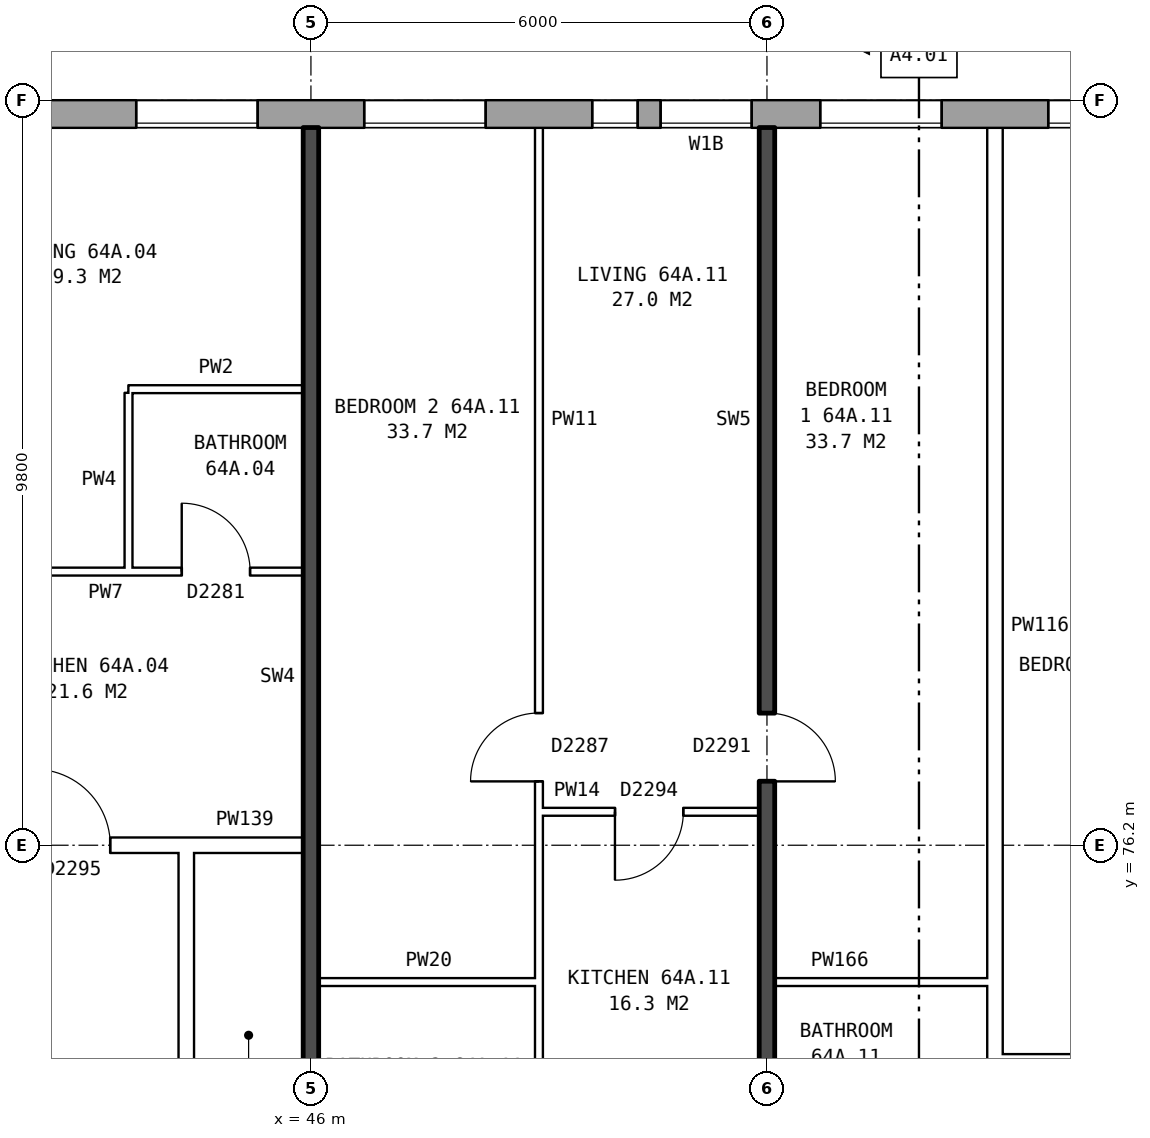
"""IFC4 building model, lengths in metres.
Left out: names, types, materials, properties, quantities, classifications, styles, units other than length and angle.
Written with IfcOpenShell. Run it as: python <this file> out.ifc"""

import sys

from ifc_helpers import new_model, si_unit, direction, frame, frame_2d, origin, place, context, subcontext, project, spatial, rectangle, extrude, element, fill, save


model = new_model("IFC4")
c1 = context("Model", 3, precision=1e-05, world=origin(), true_north=direction((0.0, 1.0)))
c2 = subcontext(c1, "Body", "Model", "MODEL_VIEW")
j1 = project(units=[si_unit("LENGTHUNIT", "METRE"), si_unit("PLANEANGLEUNIT", "RADIAN")], contexts=[c1])
p1 = place(None, origin())
s1 = spatial("IfcSite", under=j1, at=p1, CompositionType="ELEMENT")
p2 = place(p1, origin())
s2 = spatial("IfcBuilding", under=s1, at=p2, CompositionType="ELEMENT")
p3 = place(p2, frame((0.0, 0.0, 227.6)))
s3 = spatial("IfcBuildingStorey", under=s2, at=p3, CompositionType="ELEMENT", Elevation=227.6)
p4 = place(p3, frame((74.95, 85.82, 0.0), z_axis=(0.0, 0.0, 1.0), x_axis=(-1.0, 0.0, 0.0)))
e1 = element("IfcWall", 1, at=p4, inside=s3, PredefinedType="STANDARD", context=c2, shape_type="SweptSolid", body=[
    extrude(rectangle(XDim=39.875, YDim=0.36, at=frame_2d((19.938, 0.0))), origin(), (0.0, 0.0, 1.0), 2.85),
])
p5 = place(p4, frame((2.65, 0.0, 0.8)))
e2 = element("IfcOpeningElement", 2, at=p5, cuts=e1, PredefinedType="OPENING", context=c2, shape_type="SweptSolid", body=[
    extrude(rectangle(XDim=1.6, YDim=1.8, at=frame_2d((0.8, 0.9))), frame((0.0, 0.19, 0.0), z_axis=(0.0, -1.0, 0.0), x_axis=(1.0, 0.0, 0.0)), (0.0, 0.0, 1.0), 0.38),
])
p6 = place(p4, frame((5.65, 0.0, 0.8)))
e3 = element("IfcOpeningElement", 3, at=p6, cuts=e1, PredefinedType="OPENING", context=c2, shape_type="SweptSolid", body=[
    extrude(rectangle(XDim=1.6, YDim=1.8, at=frame_2d((0.8, 0.9))), frame((0.0, 0.19, 0.0), z_axis=(0.0, -1.0, 0.0), x_axis=(1.0, 0.0, 0.0)), (0.0, 0.0, 1.0), 0.38),
])
p7 = place(p4, frame((8.65, 0.0, 0.8)))
e4 = element("IfcOpeningElement", 4, at=p7, cuts=e1, PredefinedType="OPENING", context=c2, shape_type="SweptSolid", body=[
    extrude(rectangle(XDim=1.6, YDim=1.8, at=frame_2d((0.8, 0.9))), frame((0.0, 0.19, 0.0), z_axis=(0.0, -1.0, 0.0), x_axis=(1.0, 0.0, 0.0)), (0.0, 0.0, 1.0), 0.38),
])
p8 = place(p4, frame((11.65, 0.0, 0.8)))
e5 = element("IfcOpeningElement", 5, at=p8, cuts=e1, PredefinedType="OPENING", context=c2, shape_type="SweptSolid", body=[
    extrude(rectangle(XDim=1.6, YDim=1.8, at=frame_2d((0.8, 0.9))), frame((0.0, 0.19, 0.0), z_axis=(0.0, -1.0, 0.0), x_axis=(1.0, 0.0, 0.0)), (0.0, 0.0, 1.0), 0.38),
])
p9 = place(p4, frame((14.1, 0.0, 0.8)))
e6 = element("IfcOpeningElement", 6, at=p9, cuts=e1, PredefinedType="OPENING", context=c2, shape_type="SweptSolid", body=[
    extrude(rectangle(XDim=0.8, YDim=1.8, at=frame_2d((0.4, 0.9))), frame((0.0, 0.19, 0.0), z_axis=(0.0, -1.0, 0.0), x_axis=(1.0, 0.0, 0.0)), (0.0, 0.0, 1.0), 0.38),
])
p10 = place(p4, frame((17.65, 0.0, 0.8)))
e7 = element("IfcOpeningElement", 7, at=p10, cuts=e1, PredefinedType="OPENING", context=c2, shape_type="SweptSolid", body=[
    extrude(rectangle(XDim=1.6, YDim=1.8, at=frame_2d((0.8, 0.9))), frame((0.0, 0.19, 0.0), z_axis=(0.0, -1.0, 0.0), x_axis=(1.0, 0.0, 0.0)), (0.0, 0.0, 1.0), 0.38),
])
p11 = place(p4, frame((20.65, 0.0, 0.8)))
e8 = element("IfcOpeningElement", 8, at=p11, cuts=e1, PredefinedType="OPENING", context=c2, shape_type="SweptSolid", body=[
    extrude(rectangle(XDim=1.6, YDim=1.8, at=frame_2d((0.8, 0.9))), frame((0.0, 0.19, 0.0), z_axis=(0.0, -1.0, 0.0), x_axis=(1.0, 0.0, 0.0)), (0.0, 0.0, 1.0), 0.38),
])
p12 = place(p4, frame((23.15, 0.0, 0.75)))
e9 = element("IfcOpeningElement", 9, at=p12, cuts=e1, PredefinedType="OPENING", context=c2, shape_type="SweptSolid", body=[
    extrude(rectangle(XDim=1.2, YDim=1.8, at=frame_2d((0.6, 0.9))), frame((0.0, 0.19, 0.0), z_axis=(0.0, -1.0, 0.0), x_axis=(1.0, 0.0, 0.0)), (0.0, 0.0, 1.0), 0.38),
])
p13 = place(p4, frame((26.65, 0.0, 0.8)))
e10 = element("IfcOpeningElement", 10, at=p13, cuts=e1, PredefinedType="OPENING", context=c2, shape_type="SweptSolid", body=[
    extrude(rectangle(XDim=1.6, YDim=1.8, at=frame_2d((0.8, 0.9))), frame((0.0, 0.19, 0.0), z_axis=(0.0, -1.0, 0.0), x_axis=(1.0, 0.0, 0.0)), (0.0, 0.0, 1.0), 0.38),
])
p14 = place(p4, frame((29.65, 0.0, 0.8)))
e11 = element("IfcOpeningElement", 11, at=p14, cuts=e1, PredefinedType="OPENING", context=c2, shape_type="SweptSolid", body=[
    extrude(rectangle(XDim=1.6, YDim=1.8, at=frame_2d((0.8, 0.9))), frame((0.0, 0.19, 0.0), z_axis=(0.0, -1.0, 0.0), x_axis=(1.0, 0.0, 0.0)), (0.0, 0.0, 1.0), 0.38),
])
p15 = place(p4, frame((32.65, 0.0, 0.8)))
e12 = element("IfcOpeningElement", 12, at=p15, cuts=e1, PredefinedType="OPENING", context=c2, shape_type="SweptSolid", body=[
    extrude(rectangle(XDim=1.6, YDim=1.8, at=frame_2d((0.8, 0.9))), frame((0.0, 0.19, 0.0), z_axis=(0.0, -1.0, 0.0), x_axis=(1.0, 0.0, 0.0)), (0.0, 0.0, 1.0), 0.38),
])
p16 = place(p4, frame((35.65, 0.0, 0.8)))
e13 = element("IfcOpeningElement", 13, at=p16, cuts=e1, PredefinedType="OPENING", context=c2, shape_type="SweptSolid", body=[
    extrude(rectangle(XDim=1.6, YDim=1.8, at=frame_2d((0.8, 0.9))), frame((0.0, 0.19, 0.0), z_axis=(0.0, -1.0, 0.0), x_axis=(1.0, 0.0, 0.0)), (0.0, 0.0, 1.0), 0.38),
])
p17 = place(p4, frame((15.2, 0.0, 1.7)))
e14 = element("IfcOpeningElement", 14, at=p17, cuts=e1, PredefinedType="OPENING", context=c2, shape_type="SweptSolid", body=[
    extrude(rectangle(XDim=0.6, YDim=0.9, at=frame_2d((0.3, 0.45))), frame((0.0, 0.19, 0.0), z_axis=(0.0, -1.0, 0.0), x_axis=(1.0, 0.0, 0.0)), (0.0, 0.0, 1.0), 0.38),
])
p18 = place(p4, frame((24.65, 0.0, 0.35)))
e15 = element("IfcOpeningElement", 15, at=p18, cuts=e1, PredefinedType="OPENING", context=c2, shape_type="SweptSolid", body=[
    extrude(rectangle(XDim=0.6, YDim=0.9, at=frame_2d((0.3, 0.45))), frame((0.0, 0.19, 0.0), z_axis=(0.0, -1.0, 0.0), x_axis=(1.0, 0.0, 0.0)), (0.0, 0.0, 1.0), 0.38),
])
p19 = place(p3, frame((44.36, 63.9, 0.0), z_axis=(0.0, 0.0, 1.0), x_axis=(0.0, 1.0, 0.0)))
e16 = element("IfcWall", 16, at=p19, inside=s3, PredefinedType="PARTITIONING", context=c2, shape_type="SweptSolid", body=[
    extrude(rectangle(XDim=12.2, YDim=0.2, at=frame_2d((6.1, 0.0))), origin(), (0.0, 0.0, 1.0), 2.85),
])
p20 = place(p19, frame((5.1, 0.0, 0.0)))
e17 = element("IfcOpeningElement", 17, at=p20, cuts=e16, PredefinedType="OPENING", context=c2, shape_type="SweptSolid", body=[
    extrude(rectangle(XDim=2.0, YDim=2.1, at=frame_2d((1.0, 1.05))), frame((0.0, 0.11, 0.0), z_axis=(0.0, -1.0, 0.0), x_axis=(1.0, 0.0, 0.0)), (0.0, 0.0, 1.0), 0.22),
])
p21 = place(p3, frame((55.1, 73.4, 0.0), z_axis=(0.0, 0.0, 1.0), x_axis=(1.0, 0.0, 0.0)))
e18 = element("IfcWall", 18, at=p21, inside=s3, PredefinedType="PARTITIONING", context=c2, shape_type="SweptSolid", body=[
    extrude(rectangle(XDim=2.8, YDim=0.1, at=frame_2d((1.4, 0.0))), origin(), (0.0, 0.0, 1.0), 2.85),
])
p22 = place(p3, frame((46.1, 74.4, 0.0), z_axis=(0.0, 0.0, 1.0), x_axis=(1.0, 0.0, 0.0)))
e19 = element("IfcWall", 19, at=p22, inside=s3, PredefinedType="PARTITIONING", context=c2, shape_type="SweptSolid", body=[
    extrude(rectangle(XDim=2.9, YDim=0.1, at=frame_2d((1.45, 0.0))), origin(), (0.0, 0.0, 1.0), 2.85),
])
p23 = place(p3, frame((52.1, 74.4, 0.0), z_axis=(0.0, 0.0, 1.0), x_axis=(1.0, 0.0, 0.0)))
e20 = element("IfcWall", 20, at=p23, inside=s3, PredefinedType="PARTITIONING", context=c2, shape_type="SweptSolid", body=[
    extrude(rectangle(XDim=2.8, YDim=0.1, at=frame_2d((1.4, 0.0))), origin(), (0.0, 0.0, 1.0), 2.85),
])
p24 = place(p3, frame((41.36, 76.2, 0.0), z_axis=(0.0, 0.0, 1.0), x_axis=(1.0, 0.0, 0.0)))
e21 = element("IfcWall", 21, at=p24, inside=s3, PredefinedType="PARTITIONING", context=c2, shape_type="SweptSolid", body=[
    extrude(rectangle(XDim=3.0, YDim=0.2, at=frame_2d((1.5, 0.0))), origin(), (0.0, 0.0, 1.0), 2.85),
])
p25 = place(p24, frame((1.0, 0.0, 0.0)))
e22 = element("IfcOpeningElement", 22, at=p25, cuts=e21, PredefinedType="OPENING", context=c2, shape_type="SweptSolid", body=[
    extrude(rectangle(XDim=1.0, YDim=2.1, at=frame_2d((0.5, 1.05))), frame((0.0, 0.11, 0.0), z_axis=(0.0, -1.0, 0.0), x_axis=(1.0, 0.0, 0.0)), (0.0, 0.0, 1.0), 0.22),
])
p26 = place(p3, frame((44.36, 76.2, 0.0), z_axis=(0.0, 0.0, 1.0), x_axis=(1.0, 0.0, 0.0)))
e23 = element("IfcWall", 23, at=p26, inside=s3, PredefinedType="PARTITIONING", context=c2, shape_type="SweptSolid", body=[
    extrude(rectangle(XDim=1.54, YDim=0.2, at=frame_2d((0.77, 0.0))), origin(), (0.0, 0.0, 1.0), 2.85),
])
p27 = place(p3, frame((49.0, 76.64, 0.0), z_axis=(0.0, 0.0, 1.0), x_axis=(1.0, 0.0, 0.0)))
e24 = element("IfcWall", 24, at=p27, inside=s3, PredefinedType="PARTITIONING", context=c2, shape_type="SweptSolid", body=[
    extrude(rectangle(XDim=2.9, YDim=0.1, at=frame_2d((1.45, 0.0))), origin(), (0.0, 0.0, 1.0), 2.85),
])
p28 = place(p27, frame((1.0, 0.0, 0.0)))
e25 = element("IfcOpeningElement", 25, at=p28, cuts=e24, PredefinedType="OPENING", context=c2, shape_type="SweptSolid", body=[
    extrude(rectangle(XDim=0.9, YDim=2.1, at=frame_2d((0.45, 1.05))), frame((0.0, 0.06, 0.0), z_axis=(0.0, -1.0, 0.0), x_axis=(1.0, 0.0, 0.0)), (0.0, 0.0, 1.0), 0.12),
])
p29 = place(p3, frame((40.1, 79.8, 0.0), z_axis=(0.0, 0.0, 1.0), x_axis=(1.0, 0.0, 0.0)))
e26 = element("IfcWall", 26, at=p29, inside=s3, PredefinedType="PARTITIONING", context=c2, shape_type="SweptSolid", body=[
    extrude(rectangle(XDim=5.8, YDim=0.1, at=frame_2d((2.9, 0.0))), origin(), (0.0, 0.0, 1.0), 2.85),
])
p30 = place(p29, frame((1.3, 0.0, 0.0)))
e27 = element("IfcOpeningElement", 27, at=p30, cuts=e26, PredefinedType="OPENING", context=c2, shape_type="SweptSolid", body=[
    extrude(rectangle(XDim=0.9, YDim=2.1, at=frame_2d((0.45, 1.05))), frame((0.0, 0.06, 0.0), z_axis=(0.0, -1.0, 0.0), x_axis=(1.0, 0.0, 0.0)), (0.0, 0.0, 1.0), 0.12),
])
p31 = place(p29, frame((4.2, 0.0, 0.0)))
e28 = element("IfcOpeningElement", 28, at=p31, cuts=e26, PredefinedType="OPENING", context=c2, shape_type="SweptSolid", body=[
    extrude(rectangle(XDim=0.9, YDim=2.1, at=frame_2d((0.45, 1.05))), frame((0.0, 0.06, 0.0), z_axis=(0.0, -1.0, 0.0), x_axis=(1.0, 0.0, 0.0)), (0.0, 0.0, 1.0), 0.12),
])
for number, where, z_axis, x_axis in (
    (29, (43.6, 82.2, 0.0), (0.0, 0.0, 1.0), (1.0, 0.0, 0.0)),
    (30, (43.6, 79.85, 0.0), (0.0, 0.0, 1.0), (0.0, 1.0, 0.0)),
):
    element("IfcWall", number, at=place(p3, frame(where, z_axis=z_axis, x_axis=x_axis)), inside=s3, PredefinedType="PARTITIONING", context=c2, shape_type="SweptSolid", body=[
        extrude(rectangle(XDim=2.3, YDim=0.1, at=frame_2d((1.15, 0.0))), origin(), (0.0, 0.0, 1.0), 2.85),
    ])
p32 = place(p3, frame((46.0, 71.2, 0.0), z_axis=(0.0, 0.0, 1.0), x_axis=(0.0, 1.0, 0.0)))
e31 = element("IfcWall", 31, at=p32, inside=s3, PredefinedType="SOLIDWALL", context=c2, shape_type="SweptSolid", body=[
    extrude(rectangle(XDim=14.44, YDim=0.2, at=frame_2d((7.22, 0.0))), origin(), (0.0, 0.0, 1.0), 2.85),
])
p33 = place(p3, frame((49.0, 71.3, 0.0), z_axis=(0.0, 0.0, 1.0), x_axis=(0.0, 1.0, 0.0)))
e32 = element("IfcWall", 32, at=p33, inside=s3, PredefinedType="PARTITIONING", context=c2, shape_type="SweptSolid", body=[
    extrude(rectangle(XDim=14.34, YDim=0.1, at=frame_2d((7.17, 0.0))), origin(), (0.0, 0.0, 1.0), 2.85),
])
p34 = place(p33, frame((5.74, 0.0, 0.0)))
e33 = element("IfcOpeningElement", 33, at=p34, cuts=e32, PredefinedType="OPENING", context=c2, shape_type="SweptSolid", body=[
    extrude(rectangle(XDim=0.9, YDim=2.1, at=frame_2d((0.45, 1.05))), frame((0.0, 0.06, 0.0), z_axis=(0.0, -1.0, 0.0), x_axis=(1.0, 0.0, 0.0)), (0.0, 0.0, 1.0), 0.12),
])
p35 = place(p33, frame((0.4, 0.0, 0.0)))
e34 = element("IfcOpeningElement", 34, at=p35, cuts=e32, PredefinedType="OPENING", context=c2, shape_type="SweptSolid", body=[
    extrude(rectangle(XDim=0.9, YDim=2.1, at=frame_2d((0.45, 1.05))), frame((0.0, 0.06, 0.0), z_axis=(0.0, -1.0, 0.0), x_axis=(1.0, 0.0, 0.0)), (0.0, 0.0, 1.0), 0.12),
])
p36 = place(p3, frame((52.0, 71.2, 0.0), z_axis=(0.0, 0.0, 1.0), x_axis=(0.0, 1.0, 0.0)))
e35 = element("IfcWall", 35, at=p36, inside=s3, PredefinedType="SOLIDWALL", context=c2, shape_type="SweptSolid", body=[
    extrude(rectangle(XDim=14.44, YDim=0.2, at=frame_2d((7.22, 0.0))), origin(), (0.0, 0.0, 1.0), 2.85),
])
p37 = place(p36, frame((5.84, 0.0, 0.0)))
e36 = element("IfcOpeningElement", 36, at=p37, cuts=e35, PredefinedType="OPENING", context=c2, shape_type="SweptSolid", body=[
    extrude(rectangle(XDim=0.9, YDim=2.1, at=frame_2d((0.45, 1.05))), frame((0.0, 0.11, 0.0), z_axis=(0.0, -1.0, 0.0), x_axis=(1.0, 0.0, 0.0)), (0.0, 0.0, 1.0), 0.22),
])
p38 = place(p36, frame((0.4, 0.0, 0.0)))
e37 = element("IfcOpeningElement", 37, at=p38, cuts=e35, PredefinedType="OPENING", context=c2, shape_type="SweptSolid", body=[
    extrude(rectangle(XDim=0.9, YDim=2.1, at=frame_2d((0.45, 1.05))), frame((0.0, 0.11, 0.0), z_axis=(0.0, -1.0, 0.0), x_axis=(1.0, 0.0, 0.0)), (0.0, 0.0, 1.0), 0.22),
])
p39 = place(p3, frame((55.0, 71.3, 0.0), z_axis=(0.0, 0.0, 1.0), x_axis=(0.0, 1.0, 0.0)))
e38 = element("IfcWall", 38, at=p39, inside=s3, PredefinedType="PARTITIONING", context=c2, shape_type="SweptSolid", body=[
    extrude(rectangle(XDim=14.34, YDim=0.2, at=frame_2d((7.17, 0.0))), origin(), (0.0, 0.0, 1.0), 2.85),
])
p40 = place(p10, origin())
e39 = element("IfcWindow", 39, at=p40, inside=s3, PartitioningType="SINGLE_PANEL", PredefinedType="WINDOW", context=c2, shape_type="SweptSolid", body=[
    extrude(rectangle(XDim=1.6, YDim=1.8, at=frame_2d((0.8, 0.9))), frame((0.0, 0.15, 0.0), z_axis=(0.0, -1.0, 0.0), x_axis=(1.0, 0.0, 0.0)), (0.0, 0.0, 1.0), 0.06),
])
fill(e7, e39)
p41 = place(p11, origin())
e40 = element("IfcWindow", 40, at=p41, inside=s3, PartitioningType="SINGLE_PANEL", PredefinedType="WINDOW", context=c2, shape_type="SweptSolid", body=[
    extrude(rectangle(XDim=1.6, YDim=1.8, at=frame_2d((0.8, 0.9))), frame((0.0, 0.15, 0.0), z_axis=(0.0, -1.0, 0.0), x_axis=(1.0, 0.0, 0.0)), (0.0, 0.0, 1.0), 0.06),
])
fill(e8, e40)
p42 = place(p12, origin())
e41 = element("IfcWindow", 41, at=p42, inside=s3, PartitioningType="SINGLE_PANEL", PredefinedType="WINDOW", context=c2, shape_type="SweptSolid", body=[
    extrude(rectangle(XDim=1.2, YDim=1.8, at=frame_2d((0.6, 0.9))), frame((0.0, 0.15, 0.0), z_axis=(0.0, -1.0, 0.0), x_axis=(1.0, 0.0, 0.0)), (0.0, 0.0, 1.0), 0.06),
])
fill(e9, e41)
p43 = place(p13, origin())
e42 = element("IfcWindow", 42, at=p43, inside=s3, PartitioningType="SINGLE_PANEL", PredefinedType="WINDOW", context=c2, shape_type="SweptSolid", body=[
    extrude(rectangle(XDim=1.6, YDim=1.8, at=frame_2d((0.8, 0.9))), frame((0.0, 0.15, 0.0), z_axis=(0.0, -1.0, 0.0), x_axis=(1.0, 0.0, 0.0)), (0.0, 0.0, 1.0), 0.06),
])
fill(e10, e42)
p44 = place(p14, origin())
e43 = element("IfcWindow", 43, at=p44, inside=s3, PartitioningType="SINGLE_PANEL", PredefinedType="WINDOW", context=c2, shape_type="SweptSolid", body=[
    extrude(rectangle(XDim=1.6, YDim=1.8, at=frame_2d((0.8, 0.9))), frame((0.0, 0.15, 0.0), z_axis=(0.0, -1.0, 0.0), x_axis=(1.0, 0.0, 0.0)), (0.0, 0.0, 1.0), 0.06),
])
fill(e11, e43)
p45 = place(p25, origin())
e44 = element("IfcDoor", 44, at=p45, inside=s3, OperationType="SINGLE_SWING_LEFT", PredefinedType="DOOR", context=c2, shape_type="SweptSolid", body=[
    extrude(rectangle(XDim=1.0, YDim=2.1, at=frame_2d((0.5, 1.05))), frame((0.0, 0.025, 0.0), z_axis=(0.0, -1.0, 0.0), x_axis=(1.0, 0.0, 0.0)), (0.0, 0.0, 1.0), 0.05),
])
fill(e22, e44)
p46 = place(p31, origin())
e45 = element("IfcDoor", 45, at=p46, inside=s3, OperationType="SINGLE_SWING_LEFT", PredefinedType="DOOR", context=c2, shape_type="SweptSolid", body=[
    extrude(rectangle(XDim=0.9, YDim=2.1, at=frame_2d((0.45, 1.05))), frame((0.0, 0.025, 0.0), z_axis=(0.0, -1.0, 0.0), x_axis=(1.0, 0.0, 0.0)), (0.0, 0.0, 1.0), 0.05),
])
fill(e28, e45)
p47 = place(p37, frame((0.9, 0.0, 0.0), z_axis=(0.0, 0.0, 1.0), x_axis=(-1.0, 0.0, 0.0)))
e46 = element("IfcDoor", 46, at=p47, inside=s3, OperationType="SINGLE_SWING_RIGHT", PredefinedType="DOOR", context=c2, shape_type="SweptSolid", body=[
    extrude(rectangle(XDim=0.9, YDim=2.1, at=frame_2d((0.45, 1.05))), frame((0.0, 0.025, 0.0), z_axis=(0.0, -1.0, 0.0), x_axis=(1.0, 0.0, 0.0)), (0.0, 0.0, 1.0), 0.05),
])
fill(e36, e46)
p48 = place(p34, origin())
e47 = element("IfcDoor", 47, at=p48, inside=s3, OperationType="SINGLE_SWING_LEFT", PredefinedType="DOOR", context=c2, shape_type="SweptSolid", body=[
    extrude(rectangle(XDim=0.9, YDim=2.1, at=frame_2d((0.45, 1.05))), frame((0.0, 0.025, 0.0), z_axis=(0.0, -1.0, 0.0), x_axis=(1.0, 0.0, 0.0)), (0.0, 0.0, 1.0), 0.05),
])
fill(e33, e47)
p49 = place(p28, frame((0.9, 0.0, 0.0), z_axis=(0.0, 0.0, 1.0), x_axis=(-1.0, 0.0, 0.0)))
e48 = element("IfcDoor", 48, at=p49, inside=s3, OperationType="SINGLE_SWING_RIGHT", PredefinedType="DOOR", context=c2, shape_type="SweptSolid", body=[
    extrude(rectangle(XDim=0.9, YDim=2.1, at=frame_2d((0.45, 1.05))), frame((0.0, 0.025, 0.0), z_axis=(0.0, -1.0, 0.0), x_axis=(1.0, 0.0, 0.0)), (0.0, 0.0, 1.0), 0.05),
])
fill(e25, e48)
p50 = place(p18, origin())
e49 = element("IfcWindow", 49, at=p50, inside=s3, PartitioningType="SINGLE_PANEL", PredefinedType="WINDOW", context=c2, shape_type="SweptSolid", body=[
    extrude(rectangle(XDim=0.6, YDim=0.9, at=frame_2d((0.3, 0.45))), frame((0.0, 0.15, 0.0), z_axis=(0.0, -1.0, 0.0), x_axis=(1.0, 0.0, 0.0)), (0.0, 0.0, 1.0), 0.06),
])
fill(e15, e49)
save(model, sys.argv[1])
